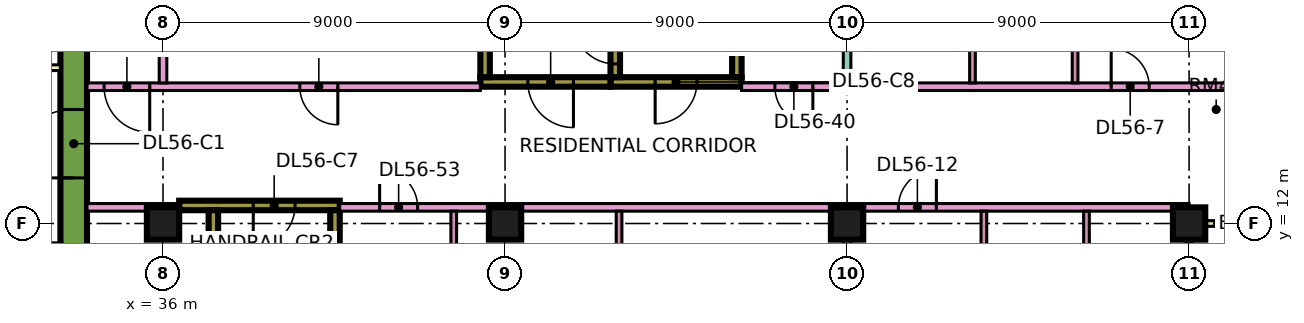
"""IFC4 building model, lengths in metres.
Left out: names, types, materials, properties, quantities, classifications, styles, units other than length and angle.
Written with IfcOpenShell. Run it as: python <this file> out.ifc"""

import sys

from ifc_helpers import new_model, si_unit, direction, frame, frame_2d, origin, origin_2d, place, context, subcontext, project, spatial, rectangle, extrude, element, fill, save


model = new_model("IFC4")
c1 = context("Model", 3, precision=1e-05, world=origin(), true_north=direction((0.0, 1.0)))
c2 = subcontext(c1, "Body", "Model", "MODEL_VIEW")
j1 = project(units=[si_unit("LENGTHUNIT", "METRE"), si_unit("PLANEANGLEUNIT", "RADIAN")], contexts=[c1])
p1 = place(None, origin())
s1 = spatial("IfcSite", under=j1, at=p1, CompositionType="ELEMENT")
p2 = place(p1, origin())
s2 = spatial("IfcBuilding", under=s1, at=p2, CompositionType="ELEMENT")
p3 = place(p2, frame((0.0, 0.0, 237.9)))
s3 = spatial("IfcBuildingStorey", under=s2, at=p3, CompositionType="ELEMENT", Elevation=237.9)
for number, where, z_axis, x_axis in (
    (1, (36.0, 12.0, 0.0), (0.0, 0.0, 1.0), (1.0, 0.0, 0.0)),
    (2, (45.0, 12.0, 0.0), (0.0, 0.0, 1.0), (1.0, 0.0, 0.0)),
    (3, (54.0, 12.0, 0.0), (0.0, 0.0, 1.0), (1.0, 0.0, 0.0)),
    (4, (63.0, 12.0, 0.0), (0.0, 0.0, 1.0), (1.0, 0.0, 0.0)),
):
    element("IfcColumn", number, at=place(p3, frame(where, z_axis=z_axis, x_axis=x_axis)), inside=s3, PredefinedType="COLUMN", context=c2, shape_type="SweptSolid", body=[
        extrude(rectangle(XDim=0.85, YDim=0.85, at=origin_2d()), origin(), (0.0, 0.0, 1.0), 3.75),
    ])
p4 = place(p3, frame((33.65, 7.7, 0.0), z_axis=(0.0, 0.0, 1.0), x_axis=(0.0, 1.0, 0.0)))
e5 = element("IfcWall", 5, at=p4, inside=s3, PredefinedType="SHEAR", context=c2, shape_type="SweptSolid", body=[
    extrude(rectangle(XDim=11.6, YDim=0.7, at=frame_2d((5.8, 0.0))), origin(), (0.0, 0.0, 1.0), 3.75),
])
p5 = place(p4, frame((5.5, 0.0, 0.0)))
e6 = element("IfcOpeningElement", 6, at=p5, cuts=e5, PredefinedType="OPENING", context=c2, shape_type="SweptSolid", body=[
    extrude(rectangle(XDim=1.8, YDim=2.4, at=frame_2d((0.9, 1.2))), frame((0.0, 0.36, 0.0), z_axis=(0.0, -1.0, 0.0), x_axis=(1.0, 0.0, 0.0)), (0.0, 0.0, 1.0), 0.72),
])
p6 = place(p3, frame((36.425, 12.475, 0.0), z_axis=(0.0, 0.0, 1.0), x_axis=(1.0, 0.0, 0.0)))
e7 = element("IfcWall", 7, at=p6, inside=s3, PredefinedType="SHEAR", context=c2, shape_type="SweptSolid", body=[
    extrude(rectangle(XDim=4.225, YDim=0.25, at=frame_2d((2.112, 0.0))), origin(), (0.0, 0.0, 1.0), 3.75),
])
p7 = place(p6, frame((1.95, 0.0, 0.0)))
e8 = element("IfcOpeningElement", 8, at=p7, cuts=e7, PredefinedType="OPENING", context=c2, shape_type="SweptSolid", body=[
    extrude(rectangle(XDim=1.1, YDim=2.2, at=frame_2d((0.55, 1.1))), frame((0.0, 0.135, 0.0), z_axis=(0.0, -1.0, 0.0), x_axis=(1.0, 0.0, 0.0)), (0.0, 0.0, 1.0), 0.27),
])
for number, where, z_axis, x_axis in (
    (9, (37.325, 5.85, 0.0), (0.0, 0.0, 1.0), (0.0, 1.0, 0.0)),
    (10, (40.525, 5.85, 0.0), (0.0, 0.0, 1.0), (0.0, 1.0, 0.0)),
):
    element("IfcWall", number, at=place(p3, frame(where, z_axis=z_axis, x_axis=x_axis)), inside=s3, PredefinedType="SHEAR", context=c2, shape_type="SweptSolid", body=[
        extrude(rectangle(XDim=6.5, YDim=0.25, at=frame_2d((3.25, 0.0))), origin(), (0.0, 0.0, 1.0), 3.75),
    ])
p8 = place(p3, frame((47.775, 15.725, 0.0), z_axis=(0.0, 0.0, 1.0), x_axis=(1.0, 0.0, 0.0)))
e11 = element("IfcWall", 11, at=p8, inside=s3, PredefinedType="SHEAR", context=c2, shape_type="SweptSolid", body=[
    extrude(rectangle(XDim=3.45, YDim=0.25, at=frame_2d((1.725, 0.0))), origin(), (0.0, 0.0, 1.0), 3.75),
])
p9 = place(p8, frame((1.175, 0.0, 0.0)))
e12 = element("IfcOpeningElement", 12, at=p9, cuts=e11, PredefinedType="OPENING", context=c2, shape_type="SweptSolid", body=[
    extrude(rectangle(XDim=1.1, YDim=2.2, at=frame_2d((0.55, 1.1))), frame((0.0, 0.135, 0.0), z_axis=(0.0, -1.0, 0.0), x_axis=(1.0, 0.0, 0.0)), (0.0, 0.0, 1.0), 0.27),
])
p10 = place(p3, frame((47.9, 15.85, 0.0), z_axis=(0.0, 0.0, 1.0), x_axis=(0.0, 1.0, 0.0)))
e13 = element("IfcWall", 13, at=p10, inside=s3, PredefinedType="SHEAR", context=c2, shape_type="SweptSolid", body=[
    extrude(rectangle(XDim=6.5, YDim=0.25, at=frame_2d((3.25, 0.0))), origin(), (0.0, 0.0, 1.0), 3.75),
])
p11 = place(p10, frame((0.35, 0.0, 0.0)))
e14 = element("IfcOpeningElement", 14, at=p11, cuts=e13, PredefinedType="OPENING", context=c2, shape_type="SweptSolid", body=[
    extrude(rectangle(XDim=1.1, YDim=2.2, at=frame_2d((0.55, 1.1))), frame((0.0, 0.135, 0.0), z_axis=(0.0, -1.0, 0.0), x_axis=(1.0, 0.0, 0.0)), (0.0, 0.0, 1.0), 0.27),
])
p12 = place(p3, frame((51.1, 15.85, 0.0), z_axis=(0.0, 0.0, 1.0), x_axis=(0.0, 1.0, 0.0)))
e15 = element("IfcWall", 15, at=p12, inside=s3, PredefinedType="SHEAR", context=c2, shape_type="SweptSolid", body=[
    extrude(rectangle(XDim=6.5, YDim=0.25, at=frame_2d((3.25, 0.0))), origin(), (0.0, 0.0, 1.0), 3.75),
])
p13 = place(p3, frame((44.35, 15.725, 0.0), z_axis=(0.0, 0.0, 1.0), x_axis=(1.0, 0.0, 0.0)))
e16 = element("IfcWall", 16, at=p13, inside=s3, PredefinedType="SHEAR", context=c2, shape_type="SweptSolid", body=[
    extrude(rectangle(XDim=3.425, YDim=0.25, at=frame_2d((1.712, 0.0))), origin(), (0.0, 0.0, 1.0), 3.75),
])
p14 = place(p13, frame((1.25, 0.0, 0.0)))
e17 = element("IfcOpeningElement", 17, at=p14, cuts=e16, PredefinedType="OPENING", context=c2, shape_type="SweptSolid", body=[
    extrude(rectangle(XDim=1.2, YDim=2.2, at=frame_2d((0.6, 1.1))), frame((0.0, 0.135, 0.0), z_axis=(0.0, -1.0, 0.0), x_axis=(1.0, 0.0, 0.0)), (0.0, 0.0, 1.0), 0.27),
])
p15 = place(p3, frame((44.475, 15.85, 0.0), z_axis=(0.0, 0.0, 1.0), x_axis=(0.0, 1.0, 0.0)))
e18 = element("IfcWall", 18, at=p15, inside=s3, PredefinedType="SHEAR", context=c2, shape_type="SweptSolid", body=[
    extrude(rectangle(XDim=6.5, YDim=0.25, at=frame_2d((3.25, 0.0))), origin(), (0.0, 0.0, 1.0), 3.75),
])
p16 = place(p15, frame((1.75, 0.0, 0.0)))
e19 = element("IfcOpeningElement", 19, at=p16, cuts=e18, PredefinedType="OPENING", context=c2, shape_type="SweptSolid", body=[
    extrude(rectangle(XDim=1.1, YDim=2.2, at=frame_2d((0.55, 1.1))), frame((0.0, 0.135, 0.0), z_axis=(0.0, -1.0, 0.0), x_axis=(1.0, 0.0, 0.0)), (0.0, 0.0, 1.0), 0.27),
])
p17 = place(p15, frame((4.3, 0.0, 0.0)))
e20 = element("IfcOpeningElement", 20, at=p17, cuts=e18, PredefinedType="OPENING", context=c2, shape_type="SweptSolid", body=[
    extrude(rectangle(XDim=1.1, YDim=2.2, at=frame_2d((0.55, 1.1))), frame((0.0, 0.135, 0.0), z_axis=(0.0, -1.0, 0.0), x_axis=(1.0, 0.0, 0.0)), (0.0, 0.0, 1.0), 0.27),
])
p18 = place(p3, frame((63.0, 1.575, 0.0), z_axis=(0.0, 0.0, 1.0), x_axis=(0.0, 1.0, 0.0)))
e21 = element("IfcWall", 21, at=p18, inside=s3, PredefinedType="SOLIDWALL", context=c2, shape_type="SweptSolid", body=[
    extrude(rectangle(XDim=10.35, YDim=0.15, at=frame_2d((5.175, 0.0))), origin(), (0.0, 0.0, 1.0), 3.35),
])
p19 = place(p18, frame((2.425, 0.0, 0.0)))
e22 = element("IfcOpeningElement", 22, at=p19, cuts=e21, PredefinedType="OPENING", context=c2, shape_type="SweptSolid", body=[
    extrude(rectangle(XDim=1.8, YDim=2.4, at=frame_2d((0.9, 1.2))), frame((0.0, 0.085, 0.0), z_axis=(0.0, -1.0, 0.0), x_axis=(1.0, 0.0, 0.0)), (0.0, 0.0, 1.0), 0.17),
])
p20 = place(p18, frame((7.075, 0.0, 0.45)))
e23 = element("IfcOpeningElement", 23, at=p20, cuts=e21, PredefinedType="OPENING", context=c2, shape_type="SweptSolid", body=[
    extrude(rectangle(XDim=2.4, YDim=2.4, at=frame_2d((1.2, 1.2))), frame((0.0, 0.085, 0.0), z_axis=(0.0, -1.0, 0.0), x_axis=(1.0, 0.0, 0.0)), (0.0, 0.0, 1.0), 0.17),
])
p21 = place(p3, frame((64.5, 12.0, 0.0), z_axis=(0.0, 0.0, 1.0), x_axis=(-1.0, 0.0, 0.0)))
e24 = element("IfcWall", 24, at=p21, inside=s3, PredefinedType="SOLIDWALL", context=c2, shape_type="SweptSolid", body=[
    extrude(rectangle(XDim=1.5, YDim=0.15, at=frame_2d((0.75, 0.0))), origin(), (0.0, 0.0, 1.0), 3.35),
])
p22 = place(p3, frame((31.3, 16.1, 0.0), z_axis=(0.0, 0.0, 1.0), x_axis=(1.0, 0.0, 0.0)))
e25 = element("IfcWall", 25, at=p22, inside=s3, PredefinedType="PARTITIONING", context=c2, shape_type="SweptSolid", body=[
    extrude(rectangle(XDim=2.0, YDim=0.15, at=frame_2d((1.0, 0.0))), origin(), (0.0, 0.0, 1.0), 3.35),
])
p23 = place(p3, frame((34.0, 12.425, 0.0), z_axis=(0.0, 0.0, 1.0), x_axis=(1.0, 0.0, 0.0)))
e26 = element("IfcWall", 26, at=p23, inside=s3, PredefinedType="PARTITIONING", context=c2, shape_type="SweptSolid", body=[
    extrude(rectangle(XDim=2.426, YDim=0.2, at=frame_2d((1.213, 0.0))), origin(), (0.0, 0.0, 1.0), 3.35),
])
p24 = place(p3, frame((34.0, 15.6, 0.0), z_axis=(0.0, 0.0, 1.0), x_axis=(1.0, 0.0, 0.0)))
e27 = element("IfcWall", 27, at=p24, inside=s3, PredefinedType="PARTITIONING", context=c2, shape_type="SweptSolid", body=[
    extrude(rectangle(XDim=10.35, YDim=0.2, at=frame_2d((5.175, 0.0))), origin(), (0.0, 0.0, 1.0), 3.35),
])
p25 = place(p24, frame((5.6, 0.0, 0.0)))
e28 = element("IfcOpeningElement", 28, at=p25, cuts=e27, PredefinedType="OPENING", context=c2, shape_type="SweptSolid", body=[
    extrude(rectangle(XDim=1.0, YDim=2.1, at=frame_2d((0.5, 1.05))), frame((0.0, 0.11, 0.0), z_axis=(0.0, -1.0, 0.0), x_axis=(1.0, 0.0, 0.0)), (0.0, 0.0, 1.0), 0.22),
])
p26 = place(p24, frame((0.45, 0.0, 0.0)))
e29 = element("IfcOpeningElement", 29, at=p26, cuts=e27, PredefinedType="OPENING", context=c2, shape_type="SweptSolid", body=[
    extrude(rectangle(XDim=1.2, YDim=2.1, at=frame_2d((0.6, 1.05))), frame((0.0, 0.11, 0.0), z_axis=(0.0, -1.0, 0.0), x_axis=(1.0, 0.0, 0.0)), (0.0, 0.0, 1.0), 0.22),
])
p27 = place(p3, frame((36.0, 15.7, 0.0), z_axis=(0.0, 0.0, 1.0), x_axis=(0.0, 1.0, 0.0)))
e30 = element("IfcWall", 30, at=p27, inside=s3, PredefinedType="PARTITIONING", context=c2, shape_type="SweptSolid", body=[
    extrude(rectangle(XDim=8.3, YDim=0.2, at=frame_2d((4.15, 0.0))), origin(), (0.0, 0.0, 1.0), 3.35),
])
p28 = place(p3, frame((40.65, 12.425, 0.0), z_axis=(0.0, 0.0, 1.0), x_axis=(1.0, 0.0, 0.0)))
e31 = element("IfcWall", 31, at=p28, inside=s3, PredefinedType="PARTITIONING", context=c2, shape_type="SweptSolid", body=[
    extrude(rectangle(XDim=22.35, YDim=0.2, at=frame_2d((11.175, 0.0))), origin(), (0.0, 0.0, 1.0), 3.35),
])
p29 = place(p28, frame((14.7, 0.0, 0.0)))
e32 = element("IfcOpeningElement", 32, at=p29, cuts=e31, PredefinedType="OPENING", context=c2, shape_type="SweptSolid", body=[
    extrude(rectangle(XDim=1.0, YDim=2.1, at=frame_2d((0.5, 1.05))), frame((0.0, 0.11, 0.0), z_axis=(0.0, -1.0, 0.0), x_axis=(1.0, 0.0, 0.0)), (0.0, 0.0, 1.0), 0.22),
])
p30 = place(p28, frame((1.05, 0.0, 0.0)))
e33 = element("IfcOpeningElement", 33, at=p30, cuts=e31, PredefinedType="OPENING", context=c2, shape_type="SweptSolid", body=[
    extrude(rectangle(XDim=1.0, YDim=2.1, at=frame_2d((0.5, 1.05))), frame((0.0, 0.11, 0.0), z_axis=(0.0, -1.0, 0.0), x_axis=(1.0, 0.0, 0.0)), (0.0, 0.0, 1.0), 0.22),
])
p31 = place(p3, frame((43.65, 5.975, 0.0), z_axis=(0.0, 0.0, 1.0), x_axis=(0.0, 1.0, 0.0)))
e34 = element("IfcWall", 34, at=p31, inside=s3, PredefinedType="PARTITIONING", context=c2, shape_type="SweptSolid", body=[
    extrude(rectangle(XDim=6.35, YDim=0.15, at=frame_2d((3.175, 0.0))), origin(), (0.0, 0.0, 1.0), 3.35),
])
p32 = place(p31, frame((4.275, 0.0, 0.0)))
e35 = element("IfcOpeningElement", 35, at=p32, cuts=e34, PredefinedType="OPENING", context=c2, shape_type="SweptSolid", body=[
    extrude(rectangle(XDim=0.9, YDim=2.1, at=frame_2d((0.45, 1.05))), frame((0.0, 0.085, 0.0), z_axis=(0.0, -1.0, 0.0), x_axis=(1.0, 0.0, 0.0)), (0.0, 0.0, 1.0), 0.17),
])
p33 = place(p3, frame((48.0, 5.975, 0.0), z_axis=(0.0, 0.0, 1.0), x_axis=(0.0, 1.0, 0.0)))
e36 = element("IfcWall", 36, at=p33, inside=s3, PredefinedType="PARTITIONING", context=c2, shape_type="SweptSolid", body=[
    extrude(rectangle(XDim=6.35, YDim=0.15, at=frame_2d((3.175, 0.0))), origin(), (0.0, 0.0, 1.0), 3.35),
])
p34 = place(p3, frame((51.225, 15.6, 0.0), z_axis=(0.0, 0.0, 1.0), x_axis=(1.0, 0.0, 0.0)))
e37 = element("IfcWall", 37, at=p34, inside=s3, PredefinedType="PARTITIONING", context=c2, shape_type="SweptSolid", body=[
    extrude(rectangle(XDim=13.125, YDim=0.2, at=frame_2d((6.562, 0.0))), origin(), (0.0, 0.0, 1.0), 3.35),
])
p35 = place(p34, frame((9.725, 0.0, 0.0)))
e38 = element("IfcOpeningElement", 38, at=p35, cuts=e37, PredefinedType="OPENING", context=c2, shape_type="SweptSolid", body=[
    extrude(rectangle(XDim=1.0, YDim=2.1, at=frame_2d((0.5, 1.05))), frame((0.0, 0.11, 0.0), z_axis=(0.0, -1.0, 0.0), x_axis=(1.0, 0.0, 0.0)), (0.0, 0.0, 1.0), 0.22),
])
p36 = place(p34, frame((0.875, 0.0, 0.0)))
e39 = element("IfcOpeningElement", 39, at=p36, cuts=e37, PredefinedType="OPENING", context=c2, shape_type="SweptSolid", body=[
    extrude(rectangle(XDim=1.0, YDim=2.1, at=frame_2d((0.5, 1.05))), frame((0.0, 0.11, 0.0), z_axis=(0.0, -1.0, 0.0), x_axis=(1.0, 0.0, 0.0)), (0.0, 0.0, 1.0), 0.22),
])
p37 = place(p3, frame((54.0, 0.074, 0.0), z_axis=(0.0, 0.0, 1.0), x_axis=(0.0, 1.0, 0.0)))
e40 = element("IfcWall", 40, at=p37, inside=s3, PredefinedType="PARTITIONING", context=c2, shape_type="SweptSolid", body=[
    extrude(rectangle(XDim=12.251, YDim=0.2, at=frame_2d((6.125, 0.0))), origin(), (0.0, 0.0, 1.0), 3.35),
])
p38 = place(p3, frame((54.0, 15.7, 0.0), z_axis=(0.0, 0.0, 1.0), x_axis=(0.0, 1.0, 0.0)))
e41 = element("IfcWall", 41, at=p38, inside=s3, PredefinedType="PARTITIONING", context=c2, shape_type="SweptSolid", body=[
    extrude(rectangle(XDim=8.226, YDim=0.2, at=frame_2d((4.113, 0.0))), origin(), (0.0, 0.0, 1.0), 3.35),
])
p39 = place(p3, frame((57.3, 15.7, 0.0), z_axis=(0.0, 0.0, 1.0), x_axis=(0.0, 1.0, 0.0)))
e42 = element("IfcWall", 42, at=p39, inside=s3, PredefinedType="PARTITIONING", context=c2, shape_type="SweptSolid", body=[
    extrude(rectangle(XDim=3.125, YDim=0.15, at=frame_2d((1.562, 0.0))), origin(), (0.0, 0.0, 1.0), 3.35),
])
p40 = place(p3, frame((57.6, 8.3, 0.0), z_axis=(0.0, 0.0, 1.0), x_axis=(0.0, 1.0, 0.0)))
e43 = element("IfcWall", 43, at=p40, inside=s3, PredefinedType="PARTITIONING", context=c2, shape_type="SweptSolid", body=[
    extrude(rectangle(XDim=4.025, YDim=0.15, at=frame_2d((2.012, 0.0))), origin(), (0.0, 0.0, 1.0), 3.35),
])
p41 = place(p3, frame((60.0, 15.7, 0.0), z_axis=(0.0, 0.0, 1.0), x_axis=(0.0, 1.0, 0.0)))
e44 = element("IfcWall", 44, at=p41, inside=s3, PredefinedType="PARTITIONING", context=c2, shape_type="SweptSolid", body=[
    extrude(rectangle(XDim=3.125, YDim=0.15, at=frame_2d((1.562, 0.0))), origin(), (0.0, 0.0, 1.0), 3.35),
])
p42 = place(p41, frame((1.2, 0.0, 0.0)))
e45 = element("IfcOpeningElement", 45, at=p42, cuts=e44, PredefinedType="OPENING", context=c2, shape_type="SweptSolid", body=[
    extrude(rectangle(XDim=0.8, YDim=2.1, at=frame_2d((0.4, 1.05))), frame((0.0, 0.085, 0.0), z_axis=(0.0, -1.0, 0.0), x_axis=(1.0, 0.0, 0.0)), (0.0, 0.0, 1.0), 0.17),
])
p43 = place(p3, frame((60.3, 8.3, 0.0), z_axis=(0.0, 0.0, 1.0), x_axis=(0.0, 1.0, 0.0)))
e46 = element("IfcWall", 46, at=p43, inside=s3, PredefinedType="PARTITIONING", context=c2, shape_type="SweptSolid", body=[
    extrude(rectangle(XDim=4.025, YDim=0.15, at=frame_2d((2.012, 0.0))), origin(), (0.0, 0.0, 1.0), 3.35),
])
p44 = place(p5, origin())
e47 = element("IfcDoor", 47, at=p44, inside=s3, OperationType="DOUBLE_DOOR_SINGLE_SWING", PredefinedType="DOOR", context=c2, shape_type="SweptSolid", body=[
    extrude(rectangle(XDim=1.8, YDim=2.4, at=frame_2d((0.9, 1.2))), frame((0.0, 0.025, 0.0), z_axis=(0.0, -1.0, 0.0), x_axis=(1.0, 0.0, 0.0)), (0.0, 0.0, 1.0), 0.05),
])
fill(e6, e47)
p45 = place(p7, frame((1.1, 0.0, 0.0), z_axis=(0.0, 0.0, 1.0), x_axis=(-1.0, 0.0, 0.0)))
e48 = element("IfcDoor", 48, at=p45, inside=s3, OperationType="SINGLE_SWING_LEFT", PredefinedType="DOOR", context=c2, shape_type="SweptSolid", body=[
    extrude(rectangle(XDim=1.1, YDim=2.2, at=frame_2d((0.55, 1.1))), frame((0.0, 0.025, 0.0), z_axis=(0.0, -1.0, 0.0), x_axis=(1.0, 0.0, 0.0)), (0.0, 0.0, 1.0), 0.05),
])
fill(e8, e48)
p46 = place(p9, frame((1.1, 0.0, 0.0), z_axis=(0.0, 0.0, 1.0), x_axis=(-1.0, 0.0, 0.0)))
e49 = element("IfcDoor", 49, at=p46, inside=s3, OperationType="SINGLE_SWING_LEFT", PredefinedType="DOOR", context=c2, shape_type="SweptSolid", body=[
    extrude(rectangle(XDim=1.1, YDim=2.2, at=frame_2d((0.55, 1.1))), frame((0.0, 0.025, 0.0), z_axis=(0.0, -1.0, 0.0), x_axis=(1.0, 0.0, 0.0)), (0.0, 0.0, 1.0), 0.05),
])
fill(e12, e49)
p47 = place(p14, origin())
e50 = element("IfcDoor", 50, at=p47, inside=s3, OperationType="SINGLE_SWING_RIGHT", PredefinedType="DOOR", context=c2, shape_type="SweptSolid", body=[
    extrude(rectangle(XDim=1.2, YDim=2.2, at=frame_2d((0.6, 1.1))), frame((0.0, 0.025, 0.0), z_axis=(0.0, -1.0, 0.0), x_axis=(1.0, 0.0, 0.0)), (0.0, 0.0, 1.0), 0.05),
])
fill(e17, e50)
p48 = place(p11, frame((1.1, 0.0, 0.0), z_axis=(0.0, 0.0, 1.0), x_axis=(-1.0, 0.0, 0.0)))
e51 = element("IfcDoor", 51, at=p48, inside=s3, OperationType="SINGLE_SWING_RIGHT", PredefinedType="DOOR", context=c2, shape_type="SweptSolid", body=[
    extrude(rectangle(XDim=1.1, YDim=2.2, at=frame_2d((0.55, 1.1))), frame((0.0, 0.025, 0.0), z_axis=(0.0, -1.0, 0.0), x_axis=(1.0, 0.0, 0.0)), (0.0, 0.0, 1.0), 0.05),
])
fill(e14, e51)
p49 = place(p25, origin())
e52 = element("IfcDoor", 52, at=p49, inside=s3, OperationType="SINGLE_SWING_RIGHT", PredefinedType="DOOR", context=c2, shape_type="SweptSolid", body=[
    extrude(rectangle(XDim=1.0, YDim=2.1, at=frame_2d((0.5, 1.05))), frame((0.0, 0.025, 0.0), z_axis=(0.0, -1.0, 0.0), x_axis=(1.0, 0.0, 0.0)), (0.0, 0.0, 1.0), 0.05),
])
fill(e28, e52)
p50 = place(p35, origin())
e53 = element("IfcDoor", 53, at=p50, inside=s3, OperationType="SINGLE_SWING_LEFT", PredefinedType="DOOR", context=c2, shape_type="SweptSolid", body=[
    extrude(rectangle(XDim=1.0, YDim=2.1, at=frame_2d((0.5, 1.05))), frame((0.0, 0.025, 0.0), z_axis=(0.0, -1.0, 0.0), x_axis=(1.0, 0.0, 0.0)), (0.0, 0.0, 1.0), 0.05),
])
fill(e38, e53)
p51 = place(p29, frame((1.0, 0.0, 0.0), z_axis=(0.0, 0.0, 1.0), x_axis=(-1.0, 0.0, 0.0)))
e54 = element("IfcDoor", 54, at=p51, inside=s3, OperationType="SINGLE_SWING_RIGHT", PredefinedType="DOOR", context=c2, shape_type="SweptSolid", body=[
    extrude(rectangle(XDim=1.0, YDim=2.1, at=frame_2d((0.5, 1.05))), frame((0.0, 0.025, 0.0), z_axis=(0.0, -1.0, 0.0), x_axis=(1.0, 0.0, 0.0)), (0.0, 0.0, 1.0), 0.05),
])
fill(e32, e54)
p52 = place(p26, origin())
e55 = element("IfcDoor", 55, at=p52, inside=s3, OperationType="SINGLE_SWING_RIGHT", PredefinedType="DOOR", context=c2, shape_type="SweptSolid", body=[
    extrude(rectangle(XDim=1.2, YDim=2.1, at=frame_2d((0.6, 1.05))), frame((0.0, 0.025, 0.0), z_axis=(0.0, -1.0, 0.0), x_axis=(1.0, 0.0, 0.0)), (0.0, 0.0, 1.0), 0.05),
])
fill(e29, e55)
p53 = place(p36, origin())
e56 = element("IfcDoor", 56, at=p53, inside=s3, OperationType="SINGLE_SWING_RIGHT", PredefinedType="DOOR", context=c2, shape_type="SweptSolid", body=[
    extrude(rectangle(XDim=1.0, YDim=2.1, at=frame_2d((0.5, 1.05))), frame((0.0, 0.025, 0.0), z_axis=(0.0, -1.0, 0.0), x_axis=(1.0, 0.0, 0.0)), (0.0, 0.0, 1.0), 0.05),
])
fill(e39, e56)
p54 = place(p30, origin())
e57 = element("IfcDoor", 57, at=p54, inside=s3, OperationType="SINGLE_SWING_LEFT", PredefinedType="DOOR", context=c2, shape_type="SweptSolid", body=[
    extrude(rectangle(XDim=1.0, YDim=2.1, at=frame_2d((0.5, 1.05))), frame((0.0, 0.025, 0.0), z_axis=(0.0, -1.0, 0.0), x_axis=(1.0, 0.0, 0.0)), (0.0, 0.0, 1.0), 0.05),
])
fill(e33, e57)
save(model, sys.argv[1])
